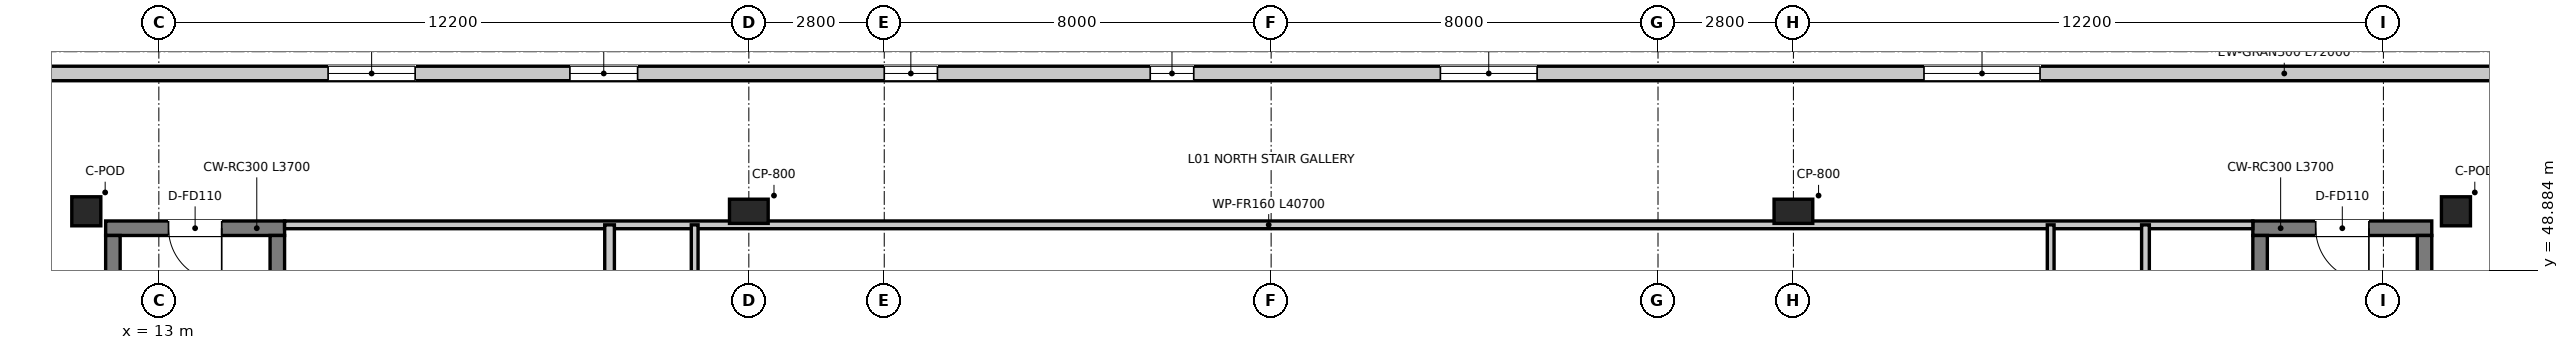
"""IFC4 building model, lengths in metres.
Left out: names, types, materials, properties, quantities, classifications, styles, units other than length and angle.
Written with IfcOpenShell. Run it as: python <this file> out.ifc"""

import sys

from ifc_helpers import new_model, si_unit, direction, frame, frame_2d, origin, origin_2d, place, context, subcontext, project, spatial, rectangle, extrude, source, transform, mapped, element, fill, save


model = new_model("IFC4")
c1 = context("Model", 3, precision=1e-05, world=origin(), true_north=direction((0.0, 1.0)))
c2 = subcontext(c1, "Body", "Model", "MODEL_VIEW")
j1 = project(units=[si_unit("LENGTHUNIT", "METRE"), si_unit("PLANEANGLEUNIT", "RADIAN")], contexts=[c1])
p1 = place(None, origin())
s1 = spatial("IfcSite", under=j1, at=p1, CompositionType="ELEMENT")
p2 = place(p1, origin())
s2 = spatial("IfcBuilding", under=s1, at=p2, CompositionType="ELEMENT")
p3 = place(p2, frame((0.0, 0.0, 5.4)))
s3 = spatial("IfcBuildingStorey", under=s2, at=p3, CompositionType="ELEMENT", Elevation=5.4)
p4 = place(p3, frame((15.6, 49.75, 0.0), z_axis=(0.0, 0.0, 1.0), x_axis=(-1.0, 0.0, 0.0)))
e1 = element("IfcWall", 1, at=p4, inside=s3, PredefinedType="SHEAR", context=c2, shape_type="SweptSolid", body=[
    extrude(rectangle(XDim=3.7, YDim=0.3, at=frame_2d((1.85, 0.0))), origin(), (0.0, 0.0, 1.0), 5.0),
])
p5 = place(p4, frame((1.3, 0.0, 0.0)))
e2 = element("IfcOpeningElement", 2, at=p5, cuts=e1, PredefinedType="OPENING", context=c2, shape_type="SweptSolid", body=[
    extrude(rectangle(XDim=1.1, YDim=2.15, at=frame_2d((0.55, 1.075))), frame((0.0, 0.16, 0.0), z_axis=(0.0, -1.0, 0.0), x_axis=(1.0, 0.0, 0.0)), (0.0, 0.0, 1.0), 0.32),
])
for number, where, z_axis, x_axis in (
    (3, (12.05, 42.12, 0.0), (0.0, 0.0, 1.0), (0.0, 1.0, 0.0)),
    (4, (15.45, 42.12, 0.0), (0.0, 0.0, 1.0), (0.0, 1.0, 0.0)),
):
    element("IfcWall", number, at=place(p3, frame(where, z_axis=z_axis, x_axis=x_axis)), inside=s3, PredefinedType="SHEAR", context=c2, shape_type="SweptSolid", body=[
        extrude(rectangle(XDim=7.48, YDim=0.3, at=frame_2d((3.74, 0.0))), origin(), (0.0, 0.0, 1.0), 5.0),
    ])
p6 = place(p3, frame((60.0, 49.75, 0.0), z_axis=(0.0, 0.0, 1.0), x_axis=(-1.0, 0.0, 0.0)))
e5 = element("IfcWall", 5, at=p6, inside=s3, PredefinedType="SHEAR", context=c2, shape_type="SweptSolid", body=[
    extrude(rectangle(XDim=3.7, YDim=0.3, at=frame_2d((1.85, 0.0))), origin(), (0.0, 0.0, 1.0), 5.0),
])
p7 = place(p6, frame((1.3, 0.0, 0.0)))
e6 = element("IfcOpeningElement", 6, at=p7, cuts=e5, PredefinedType="OPENING", context=c2, shape_type="SweptSolid", body=[
    extrude(rectangle(XDim=1.1, YDim=2.15, at=frame_2d((0.55, 1.075))), frame((0.0, 0.16, 0.0), z_axis=(0.0, -1.0, 0.0), x_axis=(1.0, 0.0, 0.0)), (0.0, 0.0, 1.0), 0.32),
])
for number, where, z_axis, x_axis in (
    (7, (56.45, 42.12, 0.0), (0.0, 0.0, 1.0), (0.0, 1.0, 0.0)),
    (8, (59.85, 42.12, 0.0), (0.0, 0.0, 1.0), (0.0, 1.0, 0.0)),
):
    element("IfcWall", number, at=place(p3, frame(where, z_axis=z_axis, x_axis=x_axis)), inside=s3, PredefinedType="SHEAR", context=c2, shape_type="SweptSolid", body=[
        extrude(rectangle(XDim=7.48, YDim=0.3, at=frame_2d((3.74, 0.0))), origin(), (0.0, 0.0, 1.0), 5.0),
    ])
m1 = source(origin(), c2, "Body", "SweptSolid", [
    extrude(rectangle(XDim=0.6, YDim=0.6, at=origin_2d()), origin(), (0.0, 0.0, 1.0), 5.0),
])
for number, where, z_axis, x_axis in (
    (9, (11.5, 50.1, 0.0), (0.0, 0.0, 1.0), (1.0, 0.0, 0.0)),
    (10, (60.5, 50.1, 0.0), (0.0, 0.0, 1.0), (1.0, 0.0, 0.0)),
):
    element("IfcColumn", number, at=place(p3, frame(where, z_axis=z_axis, x_axis=x_axis)), inside=s3, PredefinedType="COLUMN", context=c2, shape_type="MappedRepresentation", body=[
        mapped(m1, transform((0.0, 0.0, 0.0), x_axis=(1.0, 0.0, 0.0), y_axis=(0.0, 1.0, 0.0), z_axis=(0.0, 0.0, 1.0), scale=1.0)),
    ])
m2 = source(origin(), c2, "Body", "SweptSolid", [
    extrude(rectangle(XDim=0.8, YDim=0.5, at=origin_2d()), origin(), (0.0, 0.0, 1.0), 5.0),
])
for number, where, z_axis, x_axis in (
    (11, (25.2, 50.1, 0.0), (0.0, 0.0, 1.0), (1.0, 0.0, 0.0)),
    (12, (46.8, 50.1, 0.0), (0.0, 0.0, 1.0), (1.0, 0.0, 0.0)),
):
    element("IfcColumn", number, at=place(p3, frame(where, z_axis=z_axis, x_axis=x_axis)), inside=s3, PredefinedType="PILASTER", context=c2, shape_type="MappedRepresentation", body=[
        mapped(m2, transform((0.0, 0.0, 0.0), x_axis=(1.0, 0.0, 0.0), y_axis=(0.0, 1.0, 0.0), z_axis=(0.0, 0.0, 1.0), scale=1.0)),
    ])
p8 = place(p3, frame((0.0, 52.95, 0.0), z_axis=(0.0, 0.0, 1.0), x_axis=(1.0, 0.0, 0.0)))
e13 = element("IfcWall", 13, at=p8, inside=s3, PredefinedType="SOLIDWALL", context=c2, shape_type="SweptSolid", body=[
    extrude(rectangle(XDim=72.0, YDim=0.3, at=frame_2d((36.0, 0.0))), origin(), (0.0, 0.0, 1.0), 4.7),
])
p9 = place(p8, frame((5.5, 0.0, 1.05)))
e14 = element("IfcOpeningElement", 14, at=p9, cuts=e13, PredefinedType="OPENING", context=c2, shape_type="SweptSolid", body=[
    extrude(rectangle(XDim=1.6, YDim=2.0, at=frame_2d((0.8, 1.0))), frame((0.0, 0.16, 0.0), z_axis=(0.0, -1.0, 0.0), x_axis=(1.0, 0.0, 0.0)), (0.0, 0.0, 1.0), 0.32),
])
p10 = place(p8, frame((16.5, 0.0, 1.2)))
e15 = element("IfcOpeningElement", 15, at=p10, cuts=e13, PredefinedType="OPENING", context=c2, shape_type="SweptSolid", body=[
    extrude(rectangle(XDim=1.8, YDim=1.6, at=frame_2d((0.9, 0.8))), frame((0.0, 0.16, 0.0), z_axis=(0.0, -1.0, 0.0), x_axis=(1.0, 0.0, 0.0)), (0.0, 0.0, 1.0), 0.32),
])
p11 = place(p8, frame((21.5, 0.0, 1.2)))
e16 = element("IfcOpeningElement", 16, at=p11, cuts=e13, PredefinedType="OPENING", context=c2, shape_type="SweptSolid", body=[
    extrude(rectangle(XDim=1.4, YDim=1.6, at=frame_2d((0.7, 0.8))), frame((0.0, 0.16, 0.0), z_axis=(0.0, -1.0, 0.0), x_axis=(1.0, 0.0, 0.0)), (0.0, 0.0, 1.0), 0.32),
])
p12 = place(p8, frame((28.0, 0.0, 1.25)))
e17 = element("IfcOpeningElement", 17, at=p12, cuts=e13, PredefinedType="OPENING", context=c2, shape_type="SweptSolid", body=[
    extrude(rectangle(XDim=1.1, YDim=1.5, at=frame_2d((0.55, 0.75))), frame((0.0, 0.16, 0.0), z_axis=(0.0, -1.0, 0.0), x_axis=(1.0, 0.0, 0.0)), (0.0, 0.0, 1.0), 0.32),
])
p13 = place(p8, frame((33.5, 0.0, 1.25)))
e18 = element("IfcOpeningElement", 18, at=p13, cuts=e13, PredefinedType="OPENING", context=c2, shape_type="SweptSolid", body=[
    extrude(rectangle(XDim=0.9, YDim=1.5, at=frame_2d((0.45, 0.75))), frame((0.0, 0.16, 0.0), z_axis=(0.0, -1.0, 0.0), x_axis=(1.0, 0.0, 0.0)), (0.0, 0.0, 1.0), 0.32),
])
p14 = place(p8, frame((39.5, 0.0, 1.1)))
e19 = element("IfcOpeningElement", 19, at=p14, cuts=e13, PredefinedType="OPENING", context=c2, shape_type="SweptSolid", body=[
    extrude(rectangle(XDim=2.0, YDim=1.8, at=frame_2d((1.0, 0.9))), frame((0.0, 0.16, 0.0), z_axis=(0.0, -1.0, 0.0), x_axis=(1.0, 0.0, 0.0)), (0.0, 0.0, 1.0), 0.32),
])
p15 = place(p8, frame((49.5, 0.0, 0.9)))
e20 = element("IfcOpeningElement", 20, at=p15, cuts=e13, PredefinedType="OPENING", context=c2, shape_type="SweptSolid", body=[
    extrude(rectangle(XDim=2.4, YDim=2.6, at=frame_2d((1.2, 1.3))), frame((0.0, 0.16, 0.0), z_axis=(0.0, -1.0, 0.0), x_axis=(1.0, 0.0, 0.0)), (0.0, 0.0, 1.0), 0.32),
])
p16 = place(p8, frame((62.0, 0.0, 0.9)))
e21 = element("IfcOpeningElement", 21, at=p16, cuts=e13, PredefinedType="OPENING", context=c2, shape_type="SweptSolid", body=[
    extrude(rectangle(XDim=1.8, YDim=2.6, at=frame_2d((0.9, 1.3))), frame((0.0, 0.16, 0.0), z_axis=(0.0, -1.0, 0.0), x_axis=(1.0, 0.0, 0.0)), (0.0, 0.0, 1.0), 0.32),
])
p17 = place(p3, frame((15.6, 49.82, 0.0), z_axis=(0.0, 0.0, 1.0), x_axis=(1.0, 0.0, 0.0)))
e22 = element("IfcWall", 22, at=p17, inside=s3, PredefinedType="PARTITIONING", context=c2, shape_type="SweptSolid", body=[
    extrude(rectangle(XDim=40.7, YDim=0.16, at=frame_2d((20.35, 0.0))), origin(), (0.0, 0.0, 1.0), 4.01),
])
p18 = place(p3, frame((22.32, 0.605, 0.0), z_axis=(0.0, 0.0, 1.0), x_axis=(0.0, 1.0, 0.0)))
e23 = element("IfcWall", 23, at=p18, inside=s3, PredefinedType="PARTITIONING", context=c2, shape_type="SweptSolid", body=[
    extrude(rectangle(XDim=49.215, YDim=0.2, at=frame_2d((24.607, 0.0))), origin(), (0.0, 0.0, 1.0), 4.0),
])
p19 = place(p18, frame((28.795, 0.0, 0.0)))
e24 = element("IfcOpeningElement", 24, at=p19, cuts=e23, PredefinedType="OPENING", context=c2, shape_type="SweptSolid", body=[
    extrude(rectangle(XDim=1.6, YDim=2.2, at=frame_2d((0.8, 1.1))), frame((0.0, 0.11, 0.0), z_axis=(0.0, -1.0, 0.0), x_axis=(1.0, 0.0, 0.0)), (0.0, 0.0, 1.0), 0.22),
])
p20 = place(p18, frame((33.095, 0.0, 0.0)))
e25 = element("IfcOpeningElement", 25, at=p20, cuts=e23, PredefinedType="OPENING", context=c2, shape_type="SweptSolid", body=[
    extrude(rectangle(XDim=1.6, YDim=2.2, at=frame_2d((0.8, 1.1))), frame((0.0, 0.11, 0.0), z_axis=(0.0, -1.0, 0.0), x_axis=(1.0, 0.0, 0.0)), (0.0, 0.0, 1.0), 0.22),
])
p21 = place(p18, frame((42.845, 0.0, 0.0)))
e26 = element("IfcOpeningElement", 26, at=p21, cuts=e23, PredefinedType="OPENING", context=c2, shape_type="SweptSolid", body=[
    extrude(rectangle(XDim=1.1, YDim=2.15, at=frame_2d((0.55, 1.075))), frame((0.0, 0.11, 0.0), z_axis=(0.0, -1.0, 0.0), x_axis=(1.0, 0.0, 0.0)), (0.0, 0.0, 1.0), 0.22),
])
p22 = place(p3, frame((24.08, 29.1, 0.0), z_axis=(0.0, 0.0, 1.0), x_axis=(0.0, 1.0, 0.0)))
e27 = element("IfcWall", 27, at=p22, inside=s3, PredefinedType="PARTITIONING", context=c2, shape_type="SweptSolid", body=[
    extrude(rectangle(XDim=20.72, YDim=0.14, at=frame_2d((10.36, 0.0))), origin(), (0.0, 0.0, 1.0), 4.0),
])
p23 = place(p22, frame((11.2, 0.0, 0.0)))
e28 = element("IfcOpeningElement", 28, at=p23, cuts=e27, PredefinedType="OPENING", context=c2, shape_type="SweptSolid", body=[
    extrude(rectangle(XDim=1.4, YDim=2.2, at=frame_2d((0.7, 1.1))), frame((0.0, 0.08, 0.0), z_axis=(0.0, -1.0, 0.0), x_axis=(1.0, 0.0, 0.0)), (0.0, 0.0, 1.0), 0.16),
])
p24 = place(p3, frame((52.12, 29.1, 0.0), z_axis=(0.0, 0.0, 1.0), x_axis=(0.0, 1.0, 0.0)))
e29 = element("IfcWall", 29, at=p24, inside=s3, PredefinedType="PARTITIONING", context=c2, shape_type="SweptSolid", body=[
    extrude(rectangle(XDim=20.72, YDim=0.14, at=frame_2d((10.36, 0.0))), origin(), (0.0, 0.0, 1.0), 4.06),
])
p25 = place(p3, frame((54.08, 0.605, 0.0), z_axis=(0.0, 0.0, 1.0), x_axis=(0.0, 1.0, 0.0)))
e30 = element("IfcWall", 30, at=p25, inside=s3, PredefinedType="PARTITIONING", context=c2, shape_type="SweptSolid", body=[
    extrude(rectangle(XDim=49.215, YDim=0.16, at=frame_2d((24.607, 0.0))), origin(), (0.0, 0.0, 1.0), 4.06),
])
p26 = place(p25, frame((26.695, 0.0, 0.0)))
e31 = element("IfcOpeningElement", 31, at=p26, cuts=e30, PredefinedType="OPENING", context=c2, shape_type="SweptSolid", body=[
    extrude(rectangle(XDim=1.4, YDim=2.2, at=frame_2d((0.7, 1.1))), frame((0.0, 0.09, 0.0), z_axis=(0.0, -1.0, 0.0), x_axis=(1.0, 0.0, 0.0)), (0.0, 0.0, 1.0), 0.18),
])
p27 = place(p10, origin())
e32 = element("IfcWindow", 32, at=p27, inside=s3, PartitioningType="SINGLE_PANEL", PredefinedType="WINDOW", context=c2, shape_type="SweptSolid", body=[
    extrude(rectangle(XDim=1.8, YDim=1.6, at=frame_2d((0.9, 0.8))), frame((0.0, 0.03, 0.0), z_axis=(0.0, -1.0, 0.0), x_axis=(1.0, 0.0, 0.0)), (0.0, 0.0, 1.0), 0.06),
])
fill(e15, e32)
p28 = place(p11, origin())
e33 = element("IfcWindow", 33, at=p28, inside=s3, PartitioningType="SINGLE_PANEL", PredefinedType="WINDOW", context=c2, shape_type="SweptSolid", body=[
    extrude(rectangle(XDim=1.4, YDim=1.6, at=frame_2d((0.7, 0.8))), frame((0.0, 0.03, 0.0), z_axis=(0.0, -1.0, 0.0), x_axis=(1.0, 0.0, 0.0)), (0.0, 0.0, 1.0), 0.06),
])
fill(e16, e33)
p29 = place(p12, origin())
e34 = element("IfcWindow", 34, at=p29, inside=s3, PartitioningType="SINGLE_PANEL", PredefinedType="WINDOW", context=c2, shape_type="SweptSolid", body=[
    extrude(rectangle(XDim=1.1, YDim=1.5, at=frame_2d((0.55, 0.75))), frame((0.0, 0.03, 0.0), z_axis=(0.0, -1.0, 0.0), x_axis=(1.0, 0.0, 0.0)), (0.0, 0.0, 1.0), 0.06),
])
fill(e17, e34)
p30 = place(p13, origin())
e35 = element("IfcWindow", 35, at=p30, inside=s3, PartitioningType="SINGLE_PANEL", PredefinedType="WINDOW", context=c2, shape_type="SweptSolid", body=[
    extrude(rectangle(XDim=0.9, YDim=1.5, at=frame_2d((0.45, 0.75))), frame((0.0, 0.03, 0.0), z_axis=(0.0, -1.0, 0.0), x_axis=(1.0, 0.0, 0.0)), (0.0, 0.0, 1.0), 0.06),
])
fill(e18, e35)
p31 = place(p14, origin())
e36 = element("IfcWindow", 36, at=p31, inside=s3, PartitioningType="SINGLE_PANEL", PredefinedType="WINDOW", context=c2, shape_type="SweptSolid", body=[
    extrude(rectangle(XDim=2.0, YDim=1.8, at=frame_2d((1.0, 0.9))), frame((0.0, 0.03, 0.0), z_axis=(0.0, -1.0, 0.0), x_axis=(1.0, 0.0, 0.0)), (0.0, 0.0, 1.0), 0.06),
])
fill(e19, e36)
p32 = place(p15, origin())
e37 = element("IfcWindow", 37, at=p32, inside=s3, PartitioningType="SINGLE_PANEL", PredefinedType="WINDOW", context=c2, shape_type="SweptSolid", body=[
    extrude(rectangle(XDim=2.4, YDim=2.6, at=frame_2d((1.2, 1.3))), frame((0.0, 0.03, 0.0), z_axis=(0.0, -1.0, 0.0), x_axis=(1.0, 0.0, 0.0)), (0.0, 0.0, 1.0), 0.06),
])
fill(e20, e37)
p33 = place(p5, origin())
e38 = element("IfcDoor", 38, at=p33, inside=s3, OperationType="SINGLE_SWING_LEFT", PredefinedType="DOOR", context=c2, shape_type="SweptSolid", body=[
    extrude(rectangle(XDim=1.1, YDim=2.15, at=frame_2d((0.55, 1.075))), frame((0.0, 0.025, 0.0), z_axis=(0.0, -1.0, 0.0), x_axis=(1.0, 0.0, 0.0)), (0.0, 0.0, 1.0), 0.05),
])
fill(e2, e38)
p34 = place(p7, origin())
e39 = element("IfcDoor", 39, at=p34, inside=s3, OperationType="SINGLE_SWING_LEFT", PredefinedType="DOOR", context=c2, shape_type="SweptSolid", body=[
    extrude(rectangle(XDim=1.1, YDim=2.15, at=frame_2d((0.55, 1.075))), frame((0.0, 0.025, 0.0), z_axis=(0.0, -1.0, 0.0), x_axis=(1.0, 0.0, 0.0)), (0.0, 0.0, 1.0), 0.05),
])
fill(e6, e39)
save(model, sys.argv[1])
